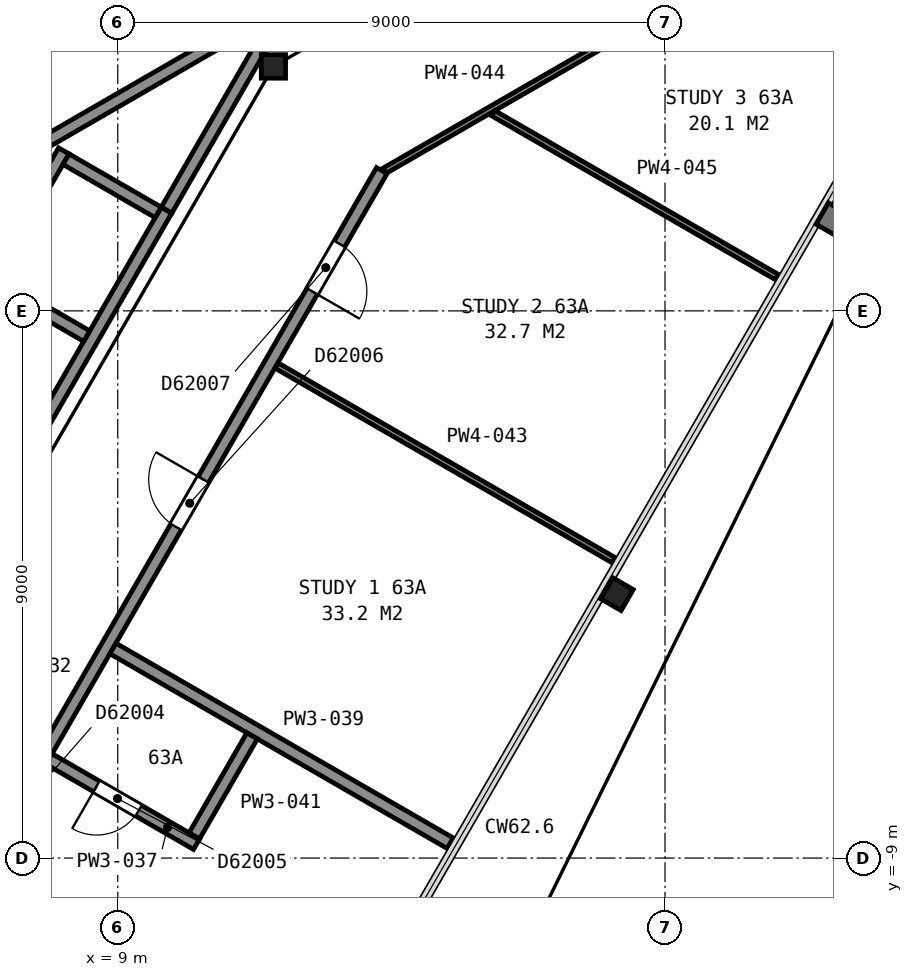
"""IFC4 building model, lengths in metres.
Left out: names, types, materials, properties, quantities, classifications, styles, units other than length and angle.
Written with IfcOpenShell. Run it as: python <this file> out.ifc"""

import sys

from ifc_helpers import new_model, si_unit, direction, frame, frame_2d, origin, origin_2d, place, context, subcontext, project, spatial, rectangle, i_section, extrude, element, fill, save


model = new_model("IFC4")
c1 = context("Model", 3, precision=1e-05, world=origin(), true_north=direction((0.0, 1.0)))
c2 = subcontext(c1, "Body", "Model", "MODEL_VIEW")
j1 = project(units=[si_unit("LENGTHUNIT", "METRE"), si_unit("PLANEANGLEUNIT", "RADIAN")], contexts=[c1])
p1 = place(None, origin())
s1 = spatial("IfcSite", under=j1, at=p1, CompositionType="ELEMENT")
p2 = place(p1, origin())
s2 = spatial("IfcBuilding", under=s1, at=p2, CompositionType="ELEMENT")
p3 = place(p2, frame((0.0, 0.0, 250.8)))
s3 = spatial("IfcBuildingStorey", under=s2, at=p3, CompositionType="ELEMENT", Elevation=250.8)
for number, where, z_axis, x_axis in (
    (1, (17.21, -4.66, 0.0), (0.0, 0.0, 1.0), (-0.5, -0.866, 0.0)),
    (2, (11.56, 4.02, 0.0), (0.0, 0.0, 1.0), (1.0, 0.0, 0.0)),
):
    element("IfcColumn", number, at=place(p3, frame(where, z_axis=z_axis, x_axis=x_axis)), inside=s3, PredefinedType="COLUMN", context=c2, shape_type="SweptSolid", body=[
        extrude(i_section(OverallWidth=0.399, OverallDepth=0.386, WebThickness=0.021, FlangeThickness=0.033, FilletRadius=0.015, at=origin_2d()), origin(), (0.0, 0.0, 1.0), 3.7),
    ])
p4 = place(p3, frame((7.678, 2.701, 0.0), z_axis=(0.0, 0.0, 1.0), x_axis=(0.866019993635, 0.500009370536, 0.0)))
e3 = element("IfcWall", 3, at=p4, inside=s3, PredefinedType="PARTITIONING", context=c2, shape_type="SweptSolid", body=[
    extrude(rectangle(XDim=9.6, YDim=0.2, at=frame_2d((4.8, 0.0))), origin(), (0.0, 0.0, 1.0), 3.45),
])
p5 = place(p3, frame((7.351, -2.587, 0.0), z_axis=(0.0, 0.0, 1.0), x_axis=(0.500002801628, 0.866023786258, 0.0)))
e4 = element("IfcWall", 4, at=p5, inside=s3, PredefinedType="PARTITIONING", context=c2, shape_type="SweptSolid", body=[
    extrude(rectangle(XDim=4.9, YDim=0.2, at=frame_2d((2.45, 0.0))), origin(), (0.0, 0.0, 1.0), 3.7),
])
p6 = place(p3, frame((5.663, -1.612, 0.0), z_axis=(0.0, 0.0, 1.0), x_axis=(0.49998122708, 0.866036242063, 0.0)))
e5 = element("IfcWall", 5, at=p6, inside=s3, PredefinedType="PARTITIONING", context=c2, shape_type="SweptSolid", body=[
    extrude(rectangle(XDim=4.9, YDim=0.2, at=frame_2d((2.45, 0.0))), origin(), (0.0, 0.0, 1.0), 3.7),
])
p7 = place(p3, frame((9.665, 1.62, 0.0), z_axis=(0.0, 0.0, 1.0), x_axis=(-0.866002029911, 0.500040482552, 0.0)))
e6 = element("IfcWall", 6, at=p7, inside=s3, PredefinedType="PARTITIONING", context=c2, shape_type="SweptSolid", body=[
    extrude(rectangle(XDim=1.75, YDim=0.2, at=frame_2d((0.875, 0.0))), origin(), (0.0, 0.0, 1.0), 3.7),
])
p8 = place(p3, frame((8.49, -0.416, 0.0), z_axis=(0.0, 0.0, 1.0), x_axis=(-0.866036909293, 0.499980071345, 0.0)))
e7 = element("IfcWall", 7, at=p8, inside=s3, PredefinedType="PARTITIONING", context=c2, shape_type="SweptSolid", body=[
    extrude(rectangle(XDim=1.75, YDim=0.2, at=frame_2d((0.875, 0.0))), origin(), (0.0, 0.0, 1.0), 3.7),
])
p9 = place(p3, frame((9.803, 1.658, 0.0), z_axis=(0.0, 0.0, 1.0), x_axis=(0.499943114462, 0.866058244174, 0.0)))
e8 = element("IfcWall", 8, at=p9, inside=s3, PredefinedType="PARTITIONING", context=c2, shape_type="SweptSolid", body=[
    extrude(rectangle(XDim=3.576, YDim=0.2, at=frame_2d((1.788, 0.0))), origin(), (0.0, 0.0, 1.0), 3.45),
])
p10 = place(p3, frame((13.342, 2.306, 0.0), z_axis=(0.0, 0.0, 1.0), x_axis=(-0.499983003136, -0.866035216706, 0.0)))
e9 = element("IfcWall", 9, at=p10, inside=s3, PredefinedType="PARTITIONING", context=c2, shape_type="SweptSolid", body=[
    extrude(rectangle(XDim=17.385, YDim=0.2, at=frame_2d((8.692, 0.0))), origin(), (0.0, 0.0, 1.0), 2.713),
])
p11 = place(p10, frame((15.185, 0.0, 0.0)))
e10 = element("IfcOpeningElement", 10, at=p11, cuts=e9, PredefinedType="OPENING", context=c2, shape_type="SweptSolid", body=[
    extrude(rectangle(XDim=0.9, YDim=2.1, at=frame_2d((0.45, 1.05))), frame((0.0, 0.11, 0.0), z_axis=(0.0, -1.0, 0.0), x_axis=(1.0, 0.0, 0.0)), (0.0, 0.0, 1.0), 0.22),
])
p12 = place(p10, frame((12.094, 0.0, 0.0)))
e11 = element("IfcOpeningElement", 11, at=p12, cuts=e9, PredefinedType="OPENING", context=c2, shape_type="SweptSolid", body=[
    extrude(rectangle(XDim=0.9, YDim=2.1, at=frame_2d((0.45, 1.05))), frame((0.0, 0.11, 0.0), z_axis=(0.0, -1.0, 0.0), x_axis=(1.0, 0.0, 0.0)), (0.0, 0.0, 1.0), 0.22),
])
p13 = place(p10, frame((5.867, 0.0, 0.0)))
e12 = element("IfcOpeningElement", 12, at=p13, cuts=e9, PredefinedType="OPENING", context=c2, shape_type="SweptSolid", body=[
    extrude(rectangle(XDim=0.9, YDim=2.1, at=frame_2d((0.45, 1.05))), frame((0.0, 0.11, 0.0), z_axis=(0.0, -1.0, 0.0), x_axis=(1.0, 0.0, 0.0)), (0.0, 0.0, 1.0), 0.22),
])
p14 = place(p10, frame((1.392, 0.0, 0.0)))
e13 = element("IfcOpeningElement", 13, at=p14, cuts=e9, PredefinedType="OPENING", context=c2, shape_type="SweptSolid", body=[
    extrude(rectangle(XDim=0.9, YDim=2.1, at=frame_2d((0.45, 1.05))), frame((0.0, 0.11, 0.0), z_axis=(0.0, -1.0, 0.0), x_axis=(1.0, 0.0, 0.0)), (0.0, 0.0, 1.0), 0.22),
])
p15 = place(p3, frame((7.871, -7.371, 0.0), z_axis=(0.0, 0.0, 1.0), x_axis=(0.866056369097, -0.49994636267, 0.0)))
e14 = element("IfcWall", 14, at=p15, inside=s3, PredefinedType="PARTITIONING", context=c2, shape_type="SweptSolid", body=[
    extrude(rectangle(XDim=2.8, YDim=0.2, at=frame_2d((1.4, 0.0))), origin(), (0.0, 0.0, 1.0), 2.713),
])
p16 = place(p15, frame((0.9, 0.0, 0.0)))
e15 = element("IfcOpeningElement", 15, at=p16, cuts=e14, PredefinedType="OPENING", context=c2, shape_type="SweptSolid", body=[
    extrude(rectangle(XDim=0.8, YDim=2.1, at=frame_2d((0.4, 1.05))), frame((0.0, 0.11, 0.0), z_axis=(0.0, -1.0, 0.0), x_axis=(1.0, 0.0, 0.0)), (0.0, 0.0, 1.0), 0.22),
])
p17 = place(p3, frame((8.921, -5.553, 0.0), z_axis=(0.0, 0.0, 1.0), x_axis=(0.866026868306, -0.499997463366, 0.0)))
e16 = element("IfcWall", 16, at=p17, inside=s3, PredefinedType="PARTITIONING", context=c2, shape_type="SweptSolid", body=[
    extrude(rectangle(XDim=6.404, YDim=0.2, at=frame_2d((3.202, 0.0))), origin(), (0.0, 0.0, 1.0), 2.713),
])
p18 = place(p3, frame((10.259, -8.635, 0.0), z_axis=(0.0, 0.0, 1.0), x_axis=(0.500078449558, 0.865980106173, 0.0)))
e17 = element("IfcWall", 17, at=p18, inside=s3, PredefinedType="PARTITIONING", context=c2, shape_type="SweptSolid", body=[
    extrude(rectangle(XDim=1.9, YDim=0.2, at=frame_2d((0.95, 0.0))), origin(), (0.0, 0.0, 1.0), 2.713),
])
p19 = place(p3, frame((11.612, -0.899, 0.0), z_axis=(0.0, 0.0, 1.0), x_axis=(0.865966403178, -0.500102178127, 0.0)))
e18 = element("IfcWall", 18, at=p19, inside=s3, PredefinedType="PARTITIONING", context=c2, shape_type="SweptSolid", body=[
    extrude(rectangle(XDim=6.4, YDim=0.1, at=frame_2d((3.2, 0.0))), origin(), (0.0, 0.0, 1.0), 2.713),
])
p20 = place(p3, frame((20.756, 6.557, 0.0), z_axis=(0.0, 0.0, 1.0), x_axis=(-0.86606177021, -0.499937006213, 0.0)))
e19 = element("IfcWall", 19, at=p20, inside=s3, PredefinedType="PARTITIONING", context=c2, shape_type="SweptSolid", body=[
    extrude(rectangle(XDim=8.504, YDim=0.1, at=frame_2d((4.252, 0.0))), origin(), (0.0, 0.0, 1.0), 2.713),
])
p21 = place(p20, frame((2.979, 0.0, 0.0)))
e20 = element("IfcOpeningElement", 20, at=p21, cuts=e19, PredefinedType="OPENING", context=c2, shape_type="SweptSolid", body=[
    extrude(rectangle(XDim=0.9, YDim=2.1, at=frame_2d((0.45, 1.05))), frame((0.0, 0.06, 0.0), z_axis=(0.0, -1.0, 0.0), x_axis=(1.0, 0.0, 0.0)), (0.0, 0.0, 1.0), 0.12),
])
p22 = place(p3, frame((15.176, 3.25, 0.0), z_axis=(0.0, 0.0, 1.0), x_axis=(0.865941828667, -0.500144728419, 0.0)))
e21 = element("IfcWall", 21, at=p22, inside=s3, PredefinedType="PARTITIONING", context=c2, shape_type="SweptSolid", body=[
    extrude(rectangle(XDim=5.388, YDim=0.1, at=frame_2d((2.694, 0.0))), origin(), (0.0, 0.0, 1.0), 2.713),
])
p23 = place(p13, origin())
e22 = element("IfcDoor", 22, at=p23, inside=s3, OperationType="SINGLE_SWING_LEFT", PredefinedType="DOOR", context=c2, shape_type="SweptSolid", body=[
    extrude(rectangle(XDim=0.9, YDim=2.1, at=frame_2d((0.45, 1.05))), frame((0.0, 0.025, 0.0), z_axis=(0.0, -1.0, 0.0), x_axis=(1.0, 0.0, 0.0)), (0.0, 0.0, 1.0), 0.05),
])
fill(e12, e22)
p24 = place(p14, origin())
e23 = element("IfcDoor", 23, at=p24, inside=s3, OperationType="SINGLE_SWING_RIGHT", PredefinedType="DOOR", context=c2, shape_type="SweptSolid", body=[
    extrude(rectangle(XDim=0.9, YDim=2.1, at=frame_2d((0.45, 1.05))), frame((0.0, 0.025, 0.0), z_axis=(0.0, -1.0, 0.0), x_axis=(1.0, 0.0, 0.0)), (0.0, 0.0, 1.0), 0.05),
])
fill(e13, e23)
p25 = place(p16, origin())
e24 = element("IfcDoor", 24, at=p25, inside=s3, OperationType="SINGLE_SWING_LEFT", PredefinedType="DOOR", context=c2, shape_type="SweptSolid", body=[
    extrude(rectangle(XDim=0.8, YDim=2.1, at=frame_2d((0.4, 1.05))), frame((0.0, 0.025, 0.0), z_axis=(0.0, -1.0, 0.0), x_axis=(1.0, 0.0, 0.0)), (0.0, 0.0, 1.0), 0.05),
])
fill(e15, e24)
save(model, sys.argv[1])
